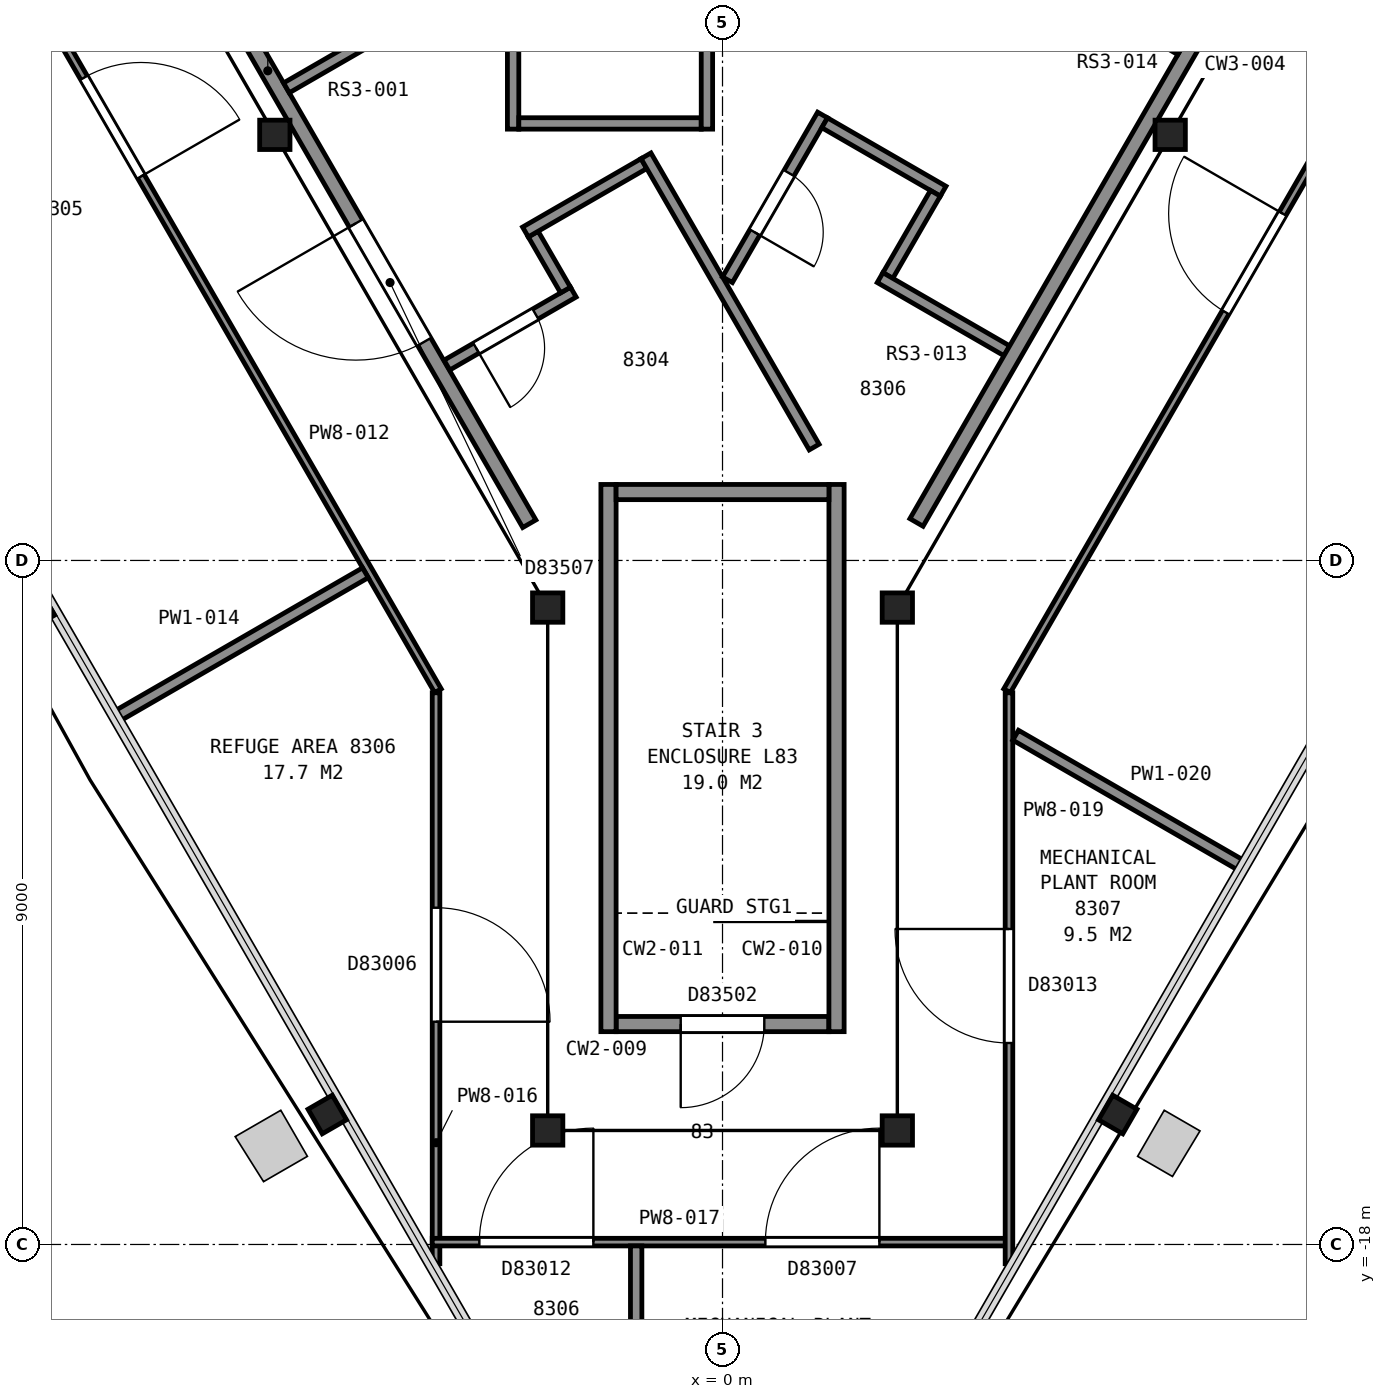
"""IFC4 building model, lengths in metres.
Left out: names, types, materials, properties, quantities, classifications, styles, units other than length and angle.
Written with IfcOpenShell. Run it as: python <this file> out.ifc"""

import sys

from ifc_helpers import new_model, si_unit, direction, frame, frame_2d, origin, origin_2d, place, context, subcontext, project, spatial, rectangle, i_section, extrude, element, fill, save


model = new_model("IFC4")
c1 = context("Model", 3, precision=1e-05, world=origin(), true_north=direction((0.0, 1.0)))
c2 = subcontext(c1, "Body", "Model", "MODEL_VIEW")
j1 = project(units=[si_unit("LENGTHUNIT", "METRE"), si_unit("PLANEANGLEUNIT", "RADIAN")], contexts=[c1])
p1 = place(None, origin())
s1 = spatial("IfcSite", under=j1, at=p1, CompositionType="ELEMENT")
p2 = place(p1, origin())
s2 = spatial("IfcBuilding", under=s1, at=p2, CompositionType="ELEMENT")
p3 = place(p2, frame((0.0, 0.0, 329.4)))
s3 = spatial("IfcBuildingStorey", under=s2, at=p3, CompositionType="ELEMENT", Elevation=329.4)
p4 = place(p3, frame((-9.04, -9.65, 0.0), z_axis=(0.0, 0.0, 1.0), x_axis=(-0.5, 0.866025403784, 0.0)))
e1 = element("IfcColumn", 1, at=p4, inside=s3, PredefinedType="COLUMN", context=c2, shape_type="SweptSolid", body=[
    extrude(i_section(OverallWidth=0.373, OverallDepth=0.368, WebThickness=0.015, FlangeThickness=0.024, FilletRadius=0.015, at=origin_2d()), origin(), (0.0, 0.0, 1.0), 4.59),
])
p5 = place(p3, frame((-5.2, -16.29, 0.0), z_axis=(0.0, 0.0, 1.0), x_axis=(-0.5, 0.866025403784, 0.0)))
e2 = element("IfcColumn", 2, at=p5, inside=s3, PredefinedType="COLUMN", context=c2, shape_type="SweptSolid", body=[
    extrude(i_section(OverallWidth=0.373, OverallDepth=0.368, WebThickness=0.015, FlangeThickness=0.024, FilletRadius=0.015, at=origin_2d()), origin(), (0.0, 0.0, 1.0), 4.34),
])
p6 = place(p3, frame((5.2, -16.29, 0.0), z_axis=(0.0, 0.0, 1.0), x_axis=(-0.5, -0.866025403784, 0.0)))
e3 = element("IfcColumn", 3, at=p6, inside=s3, PredefinedType="COLUMN", context=c2, shape_type="SweptSolid", body=[
    extrude(i_section(OverallWidth=0.373, OverallDepth=0.368, WebThickness=0.015, FlangeThickness=0.024, FilletRadius=0.015, at=origin_2d()), origin(), (0.0, 0.0, 1.0), 4.13),
])
for number, where, z_axis, x_axis in (
    (4, (-5.89, -3.4, 0.0), (0.0, 0.0, 1.0), (1.0, 0.0, 0.0)),
    (5, (-2.3, -9.62, 0.0), (0.0, 0.0, 1.0), (1.0, 0.0, 0.0)),
    (6, (-2.3, -16.5, 0.0), (0.0, 0.0, 1.0), (-1.0, 0.0, 0.0)),
    (7, (2.3, -16.5, 0.0), (0.0, 0.0, 1.0), (-1.0, 0.0, 0.0)),
    (8, (2.3, -9.62, 0.0), (0.0, 0.0, 1.0), (1.0, 0.0, 0.0)),
    (9, (5.89, -3.4, 0.0), (0.0, 0.0, 1.0), (1.0, 0.0, 0.0)),
):
    element("IfcColumn", number, at=place(p3, frame(where, z_axis=z_axis, x_axis=x_axis)), inside=s3, PredefinedType="COLUMN", context=c2, shape_type="SweptSolid", body=[
        extrude(i_section(OverallWidth=0.399, OverallDepth=0.386, WebThickness=0.021, FlangeThickness=0.033, FilletRadius=0.015, at=origin_2d()), origin(), (0.0, 0.0, 1.0), 4.2),
    ])
p7 = place(p3, frame((-1.4, -15.1, 0.0), z_axis=(0.0, 0.0, 1.0), x_axis=(1.0, 0.0, 0.0)))
e10 = element("IfcWall", 10, at=p7, inside=s3, PredefinedType="PARTITIONING", context=c2, shape_type="SweptSolid", body=[
    extrude(rectangle(XDim=2.8, YDim=0.2, at=frame_2d((1.4, 0.0))), origin(), (0.0, 0.0, 1.0), 4.2),
])
p8 = place(p7, frame((0.85, 0.0, 0.0)))
e11 = element("IfcOpeningElement", 11, at=p8, cuts=e10, PredefinedType="OPENING", context=c2, shape_type="SweptSolid", body=[
    extrude(rectangle(XDim=1.1, YDim=2.1, at=frame_2d((0.55, 1.05))), frame((0.0, 0.11, 0.0), z_axis=(0.0, -1.0, 0.0), x_axis=(1.0, 0.0, 0.0)), (0.0, 0.0, 1.0), 0.22),
])
for number, where, z_axis, x_axis in (
    (12, (1.5, -8.0, 0.0), (0.0, 0.0, 1.0), (0.0, -1.0, 0.0)),
    (13, (-1.5, -8.0, 0.0), (0.0, 0.0, 1.0), (0.0, -1.0, 0.0)),
):
    element("IfcWall", number, at=place(p3, frame(where, z_axis=z_axis, x_axis=x_axis)), inside=s3, PredefinedType="PARTITIONING", context=c2, shape_type="SweptSolid", body=[
        extrude(rectangle(XDim=7.2, YDim=0.2, at=frame_2d((3.6, 0.0))), origin(), (0.0, 0.0, 1.0), 4.2),
    ])
p9 = place(p3, frame((-1.4, -8.1, 0.0), z_axis=(0.0, 0.0, 1.0), x_axis=(1.0, 0.0, 0.0)))
e14 = element("IfcWall", 14, at=p9, inside=s3, PredefinedType="PARTITIONING", context=c2, shape_type="SweptSolid", body=[
    extrude(rectangle(XDim=2.8, YDim=0.2, at=frame_2d((1.4, 0.0))), origin(), (0.0, 0.0, 1.0), 4.2),
])
p10 = place(p3, frame((-7.141, -0.551, 0.0), z_axis=(0.0, 0.0, 1.0), x_axis=(0.499992795234, -0.866029563418, 0.0)))
e15 = element("IfcWall", 15, at=p10, inside=s3, PredefinedType="PARTITIONING", context=c2, shape_type="SweptSolid", body=[
    extrude(rectangle(XDim=9.198, YDim=0.2, at=frame_2d((4.599, 0.0))), origin(), (0.0, 0.0, 1.0), 3.9),
])
p11 = place(p10, frame((4.634, 0.0, 0.0)))
e16 = element("IfcOpeningElement", 16, at=p11, cuts=e15, PredefinedType="OPENING", context=c2, shape_type="SweptSolid", body=[
    extrude(rectangle(XDim=1.8, YDim=2.1, at=frame_2d((0.9, 1.05))), frame((0.0, 0.11, 0.0), z_axis=(0.0, -1.0, 0.0), x_axis=(1.0, 0.0, 0.0)), (0.0, 0.0, 1.0), 0.22),
])
p12 = place(p3, frame((-5.737, -2.782, 0.0), z_axis=(0.0, 0.0, 1.0), x_axis=(0.866000843773, 0.500042536776, 0.0)))
e17 = element("IfcWall", 17, at=p12, inside=s3, PredefinedType="PARTITIONING", context=c2, shape_type="SweptSolid", body=[
    extrude(rectangle(XDim=2.025, YDim=0.15, at=frame_2d((1.012, 0.0))), origin(), (0.0, 0.0, 1.0), 3.9),
])
p13 = place(p3, frame((-1.963, -5.469, 0.0), z_axis=(0.0, 0.0, 1.0), x_axis=(-0.866043720474, -0.49996827322, 0.0)))
e18 = element("IfcWall", 18, at=p13, inside=s3, PredefinedType="PARTITIONING", context=c2, shape_type="SweptSolid", body=[
    extrude(rectangle(XDim=1.92, YDim=0.15, at=frame_2d((0.96, 0.0))), origin(), (0.0, 0.0, 1.0), 3.9),
])
p14 = place(p13, frame((0.575, 0.0, 0.0)))
e19 = element("IfcOpeningElement", 19, at=p14, cuts=e18, PredefinedType="OPENING", context=c2, shape_type="SweptSolid", body=[
    extrude(rectangle(XDim=0.9, YDim=2.1, at=frame_2d((0.45, 1.05))), frame((0.0, 0.085, 0.0), z_axis=(0.0, -1.0, 0.0), x_axis=(1.0, 0.0, 0.0)), (0.0, 0.0, 1.0), 0.17),
])
p15 = place(p3, frame((-2.755, -0.102, 0.0), z_axis=(0.0, 0.0, 1.0), x_axis=(0.0, -1.0, 0.0)))
e20 = element("IfcWall", 20, at=p15, inside=s3, PredefinedType="PARTITIONING", context=c2, shape_type="SweptSolid", body=[
    extrude(rectangle(XDim=3.223, YDim=0.15, at=frame_2d((1.611, 0.0))), origin(), (0.0, 0.0, 1.0), 3.9),
])
p16 = place(p15, frame((1.148, 0.0, 0.0)))
e21 = element("IfcOpeningElement", 21, at=p16, cuts=e20, PredefinedType="OPENING", context=c2, shape_type="SweptSolid", body=[
    extrude(rectangle(XDim=0.9, YDim=2.1, at=frame_2d((0.45, 1.05))), frame((0.0, 0.085, 0.0), z_axis=(0.0, -1.0, 0.0), x_axis=(1.0, 0.0, 0.0)), (0.0, 0.0, 1.0), 0.17),
])
p17 = place(p3, frame((-2.68, -3.25, 0.0), z_axis=(0.0, 0.0, 1.0), x_axis=(1.0, 0.0, 0.0)))
e22 = element("IfcWall", 22, at=p17, inside=s3, PredefinedType="PARTITIONING", context=c2, shape_type="SweptSolid", body=[
    extrude(rectangle(XDim=2.4, YDim=0.15, at=frame_2d((1.2, 0.0))), origin(), (0.0, 0.0, 1.0), 3.9),
])
p18 = place(p3, frame((-2.49, -4.706, 0.0), z_axis=(0.0, 0.0, 1.0), x_axis=(0.500062241894, -0.865989465428, 0.0)))
e23 = element("IfcWall", 23, at=p18, inside=s3, PredefinedType="PARTITIONING", context=c2, shape_type="SweptSolid", body=[
    extrude(rectangle(XDim=0.85, YDim=0.15, at=frame_2d((0.425, 0.0))), origin(), (0.0, 0.0, 1.0), 3.9),
])
p19 = place(p3, frame((-2.593, -4.678, 0.0), z_axis=(0.0, 0.0, 1.0), x_axis=(0.866081705922, 0.499902469156, 0.0)))
e24 = element("IfcWall", 24, at=p19, inside=s3, PredefinedType="PARTITIONING", context=c2, shape_type="SweptSolid", body=[
    extrude(rectangle(XDim=1.8, YDim=0.15, at=frame_2d((0.9, 0.0))), origin(), (0.0, 0.0, 1.0), 3.9),
])
p20 = place(p3, frame((-1.007, -3.676, 0.0), z_axis=(0.0, 0.0, 1.0), x_axis=(0.500037662692, -0.866003658127, 0.0)))
e25 = element("IfcWall", 25, at=p20, inside=s3, PredefinedType="PARTITIONING", context=c2, shape_type="SweptSolid", body=[
    extrude(rectangle(XDim=4.425, YDim=0.15, at=frame_2d((2.212, 0.0))), origin(), (0.0, 0.0, 1.0), 3.9),
])
p21 = place(p3, frame((-0.205, -3.325, 0.0), z_axis=(0.0, 0.0, 1.0), x_axis=(0.0, 1.0, 0.0)))
e26 = element("IfcWall", 26, at=p21, inside=s3, PredefinedType="PARTITIONING", context=c2, shape_type="SweptSolid", body=[
    extrude(rectangle(XDim=3.223, YDim=0.15, at=frame_2d((1.611, 0.0))), origin(), (0.0, 0.0, 1.0), 3.9),
])
p22 = place(p3, frame((1.316, -3.139, 0.0), z_axis=(0.0, 0.0, 1.0), x_axis=(-0.500063042646, -0.865989003036, 0.0)))
e27 = element("IfcWall", 27, at=p22, inside=s3, PredefinedType="PARTITIONING", context=c2, shape_type="SweptSolid", body=[
    extrude(rectangle(XDim=2.503, YDim=0.15, at=frame_2d((1.251, 0.0))), origin(), (0.0, 0.0, 1.0), 3.9),
])
p23 = place(p22, frame((0.883, 0.0, 0.0)))
e28 = element("IfcOpeningElement", 28, at=p23, cuts=e27, PredefinedType="OPENING", context=c2, shape_type="SweptSolid", body=[
    extrude(rectangle(XDim=0.9, YDim=2.1, at=frame_2d((0.45, 1.05))), frame((0.0, 0.085, 0.0), z_axis=(0.0, -1.0, 0.0), x_axis=(1.0, 0.0, 0.0)), (0.0, 0.0, 1.0), 0.17),
])
p24 = place(p3, frame((1.344, -3.241, 0.0), z_axis=(0.0, 0.0, 1.0), x_axis=(0.865989075817, -0.500062916607, 0.0)))
e29 = element("IfcWall", 29, at=p24, inside=s3, PredefinedType="PARTITIONING", context=c2, shape_type="SweptSolid", body=[
    extrude(rectangle(XDim=1.8, YDim=0.15, at=frame_2d((0.9, 0.0))), origin(), (0.0, 0.0, 1.0), 3.9),
])
p25 = place(p3, frame((2.176, -5.251, 0.0), z_axis=(0.0, 0.0, 1.0), x_axis=(0.500173430036, 0.86592525075, 0.0)))
e30 = element("IfcWall", 30, at=p25, inside=s3, PredefinedType="PARTITIONING", context=c2, shape_type="SweptSolid", body=[
    extrude(rectangle(XDim=1.25, YDim=0.15, at=frame_2d((0.625, 0.0))), origin(), (0.0, 0.0, 1.0), 3.9),
])
p26 = place(p3, frame((2.073, -5.279, 0.0), z_axis=(0.0, 0.0, 1.0), x_axis=(0.86609690551, -0.499876134923, 0.0)))
e31 = element("IfcWall", 31, at=p26, inside=s3, PredefinedType="PARTITIONING", context=c2, shape_type="SweptSolid", body=[
    extrude(rectangle(XDim=1.925, YDim=0.15, at=frame_2d((0.963, 0.0))), origin(), (0.0, 0.0, 1.0), 3.9),
])
p27 = place(p3, frame((2.552, -8.5, 0.0), z_axis=(0.0, 0.0, 1.0), x_axis=(0.499981156672, 0.866036282712, 0.0)))
e32 = element("IfcWall", 32, at=p27, inside=s3, PredefinedType="PARTITIONING", context=c2, shape_type="SweptSolid", body=[
    extrude(rectangle(XDim=13.915, YDim=0.2, at=frame_2d((6.957, 0.0))), origin(), (0.0, 0.0, 1.0), 3.9),
])
p28 = place(p3, frame((4.188, -1.217, 0.0), z_axis=(0.0, 0.0, 1.0), x_axis=(0.865913749133, -0.500193341681, 0.0)))
e33 = element("IfcWall", 33, at=p28, inside=s3, PredefinedType="PARTITIONING", context=c2, shape_type="SweptSolid", body=[
    extrude(rectangle(XDim=2.124, YDim=0.15, at=frame_2d((1.062, 0.0))), origin(), (0.0, 0.0, 1.0), 3.9),
])
p29 = place(p28, frame((0.575, 0.0, 0.0)))
e34 = element("IfcOpeningElement", 34, at=p29, cuts=e33, PredefinedType="OPENING", context=c2, shape_type="SweptSolid", body=[
    extrude(rectangle(XDim=0.9, YDim=2.1, at=frame_2d((0.45, 1.05))), frame((0.0, 0.085, 0.0), z_axis=(0.0, -1.0, 0.0), x_axis=(1.0, 0.0, 0.0)), (0.0, 0.0, 1.0), 0.17),
])
p30 = place(p3, frame((-3.744, -10.714, 0.0), z_axis=(0.0, 0.0, 1.0), x_axis=(-0.500044034969, 0.86599997869, 0.0)))
e35 = element("IfcWall", 35, at=p30, inside=s3, PredefinedType="PARTITIONING", context=c2, shape_type="SweptSolid", body=[
    extrude(rectangle(XDim=15.553, YDim=0.1, at=frame_2d((7.776, 0.0))), origin(), (0.0, 0.0, 1.0), 3.297),
])
p31 = place(p30, frame((7.814, 0.0, 0.0)))
e36 = element("IfcOpeningElement", 36, at=p31, cuts=e35, PredefinedType="OPENING", context=c2, shape_type="SweptSolid", body=[
    extrude(rectangle(XDim=1.5, YDim=2.1, at=frame_2d((0.75, 1.05))), frame((0.0, 0.06, 0.0), z_axis=(0.0, -1.0, 0.0), x_axis=(1.0, 0.0, 0.0)), (0.0, 0.0, 1.0), 0.12),
])
p32 = place(p3, frame((-7.975, -11.054, 0.0), z_axis=(0.0, 0.0, 1.0), x_axis=(0.865998594852, 0.500046431558, 0.0)))
e37 = element("IfcWall", 37, at=p32, inside=s3, PredefinedType="PARTITIONING", context=c2, shape_type="SweptSolid", body=[
    extrude(rectangle(XDim=3.783, YDim=0.15, at=frame_2d((1.892, 0.0))), origin(), (0.0, 0.0, 1.0), 3.297),
])
p33 = place(p3, frame((-3.769, -18.253, 0.0), z_axis=(0.0, 0.0, 1.0), x_axis=(0.0, 1.0, 0.0)))
e38 = element("IfcWall", 38, at=p33, inside=s3, PredefinedType="PARTITIONING", context=c2, shape_type="SweptSolid", body=[
    extrude(rectangle(XDim=7.512, YDim=0.1, at=frame_2d((3.756, 0.0))), origin(), (0.0, 0.0, 1.0), 3.297),
])
p34 = place(p33, frame((3.184, 0.0, 0.0)))
e39 = element("IfcOpeningElement", 39, at=p34, cuts=e38, PredefinedType="OPENING", context=c2, shape_type="SweptSolid", body=[
    extrude(rectangle(XDim=1.5, YDim=2.1, at=frame_2d((0.75, 1.05))), frame((0.0, 0.06, 0.0), z_axis=(0.0, -1.0, 0.0), x_axis=(1.0, 0.0, 0.0)), (0.0, 0.0, 1.0), 0.12),
])
p35 = place(p3, frame((3.769, -17.969, 0.0), z_axis=(0.0, 0.0, 1.0), x_axis=(-1.0, 0.0, 0.0)))
e40 = element("IfcWall", 40, at=p35, inside=s3, PredefinedType="PARTITIONING", context=c2, shape_type="SweptSolid", body=[
    extrude(rectangle(XDim=7.588, YDim=0.1, at=frame_2d((3.794, 0.0))), origin(), (0.0, 0.0, 1.0), 3.297),
])
p36 = place(p35, frame((1.705, 0.0, 0.0)))
e41 = element("IfcOpeningElement", 41, at=p36, cuts=e40, PredefinedType="OPENING", context=c2, shape_type="SweptSolid", body=[
    extrude(rectangle(XDim=1.5, YDim=2.1, at=frame_2d((0.75, 1.05))), frame((0.0, 0.06, 0.0), z_axis=(0.0, -1.0, 0.0), x_axis=(1.0, 0.0, 0.0)), (0.0, 0.0, 1.0), 0.12),
])
p37 = place(p35, frame((5.468, 0.0, 0.0)))
e42 = element("IfcOpeningElement", 42, at=p37, cuts=e40, PredefinedType="OPENING", context=c2, shape_type="SweptSolid", body=[
    extrude(rectangle(XDim=1.5, YDim=2.1, at=frame_2d((0.75, 1.05))), frame((0.0, 0.06, 0.0), z_axis=(0.0, -1.0, 0.0), x_axis=(1.0, 0.0, 0.0)), (0.0, 0.0, 1.0), 0.12),
])
p38 = place(p3, frame((-1.136, -22.764, 0.0), z_axis=(0.0, 0.0, 1.0), x_axis=(0.0, 1.0, 0.0)))
e43 = element("IfcWall", 43, at=p38, inside=s3, PredefinedType="PARTITIONING", context=c2, shape_type="SweptSolid", body=[
    extrude(rectangle(XDim=4.745, YDim=0.15, at=frame_2d((2.373, 0.0))), origin(), (0.0, 0.0, 1.0), 3.297),
])
p39 = place(p3, frame((3.769, -10.741, 0.0), z_axis=(0.0, 0.0, 1.0), x_axis=(0.0, -1.0, 0.0)))
e44 = element("IfcWall", 44, at=p39, inside=s3, PredefinedType="PARTITIONING", context=c2, shape_type="SweptSolid", body=[
    extrude(rectangle(XDim=7.512, YDim=0.1, at=frame_2d((3.756, 0.0))), origin(), (0.0, 0.0, 1.0), 3.297),
])
p40 = place(p39, frame((3.108, 0.0, 0.0)))
e45 = element("IfcOpeningElement", 45, at=p40, cuts=e44, PredefinedType="OPENING", context=c2, shape_type="SweptSolid", body=[
    extrude(rectangle(XDim=1.5, YDim=2.1, at=frame_2d((0.75, 1.05))), frame((0.0, 0.06, 0.0), z_axis=(0.0, -1.0, 0.0), x_axis=(1.0, 0.0, 0.0)), (0.0, 0.0, 1.0), 0.12),
])
p41 = place(p3, frame((3.856, -11.3, 0.0), z_axis=(0.0, 0.0, 1.0), x_axis=(0.866084061191, -0.499898388626, 0.0)))
e46 = element("IfcWall", 46, at=p41, inside=s3, PredefinedType="PARTITIONING", context=c2, shape_type="SweptSolid", body=[
    extrude(rectangle(XDim=3.444, YDim=0.15, at=frame_2d((1.722, 0.0))), origin(), (0.0, 0.0, 1.0), 3.297),
])
p42 = place(p3, frame((11.521, 2.754, 0.0), z_axis=(0.0, 0.0, 1.0), x_axis=(-0.500044034969, -0.86599997869, 0.0)))
e47 = element("IfcWall", 47, at=p42, inside=s3, PredefinedType="PARTITIONING", context=c2, shape_type="SweptSolid", body=[
    extrude(rectangle(XDim=15.553, YDim=0.1, at=frame_2d((7.776, 0.0))), origin(), (0.0, 0.0, 1.0), 3.297),
])
p43 = place(p42, frame((8.303, 0.0, 0.0)))
e48 = element("IfcOpeningElement", 48, at=p43, cuts=e47, PredefinedType="OPENING", context=c2, shape_type="SweptSolid", body=[
    extrude(rectangle(XDim=1.5, YDim=2.1, at=frame_2d((0.75, 1.05))), frame((0.0, 0.06, 0.0), z_axis=(0.0, -1.0, 0.0), x_axis=(1.0, 0.0, 0.0)), (0.0, 0.0, 1.0), 0.12),
])
p44 = place(p42, frame((0.561, 0.0, 0.0)))
e49 = element("IfcOpeningElement", 49, at=p44, cuts=e47, PredefinedType="OPENING", context=c2, shape_type="SweptSolid", body=[
    extrude(rectangle(XDim=1.5, YDim=2.1, at=frame_2d((0.75, 1.05))), frame((0.0, 0.06, 0.0), z_axis=(0.0, -1.0, 0.0), x_axis=(1.0, 0.0, 0.0)), (0.0, 0.0, 1.0), 0.12),
])
p45 = place(p8, origin())
e50 = element("IfcDoor", 50, at=p45, inside=s3, OperationType="SINGLE_SWING_LEFT", PredefinedType="DOOR", context=c2, shape_type="SweptSolid", body=[
    extrude(rectangle(XDim=1.1, YDim=2.1, at=frame_2d((0.55, 1.05))), frame((0.0, 0.025, 0.0), z_axis=(0.0, -1.0, 0.0), x_axis=(1.0, 0.0, 0.0)), (0.0, 0.0, 1.0), 0.05),
])
fill(e11, e50)
p46 = place(p11, origin())
e51 = element("IfcDoor", 51, at=p46, inside=s3, OperationType="DOUBLE_DOOR_SINGLE_SWING", PredefinedType="DOOR", context=c2, shape_type="SweptSolid", body=[
    extrude(rectangle(XDim=1.8, YDim=2.1, at=frame_2d((0.9, 1.05))), frame((0.0, 0.025, 0.0), z_axis=(0.0, -1.0, 0.0), x_axis=(1.0, 0.0, 0.0)), (0.0, 0.0, 1.0), 0.05),
])
fill(e16, e51)
p47 = place(p14, origin())
e52 = element("IfcDoor", 52, at=p47, inside=s3, OperationType="SINGLE_SWING_RIGHT", PredefinedType="DOOR", context=c2, shape_type="SweptSolid", body=[
    extrude(rectangle(XDim=0.9, YDim=2.1, at=frame_2d((0.45, 1.05))), frame((0.0, 0.025, 0.0), z_axis=(0.0, -1.0, 0.0), x_axis=(1.0, 0.0, 0.0)), (0.0, 0.0, 1.0), 0.05),
])
fill(e19, e52)
p48 = place(p23, origin())
e53 = element("IfcDoor", 53, at=p48, inside=s3, OperationType="SINGLE_SWING_RIGHT", PredefinedType="DOOR", context=c2, shape_type="SweptSolid", body=[
    extrude(rectangle(XDim=0.9, YDim=2.1, at=frame_2d((0.45, 1.05))), frame((0.0, 0.025, 0.0), z_axis=(0.0, -1.0, 0.0), x_axis=(1.0, 0.0, 0.0)), (0.0, 0.0, 1.0), 0.05),
])
fill(e28, e53)
p49 = place(p31, origin())
e54 = element("IfcDoor", 54, at=p49, inside=s3, OperationType="DOUBLE_DOOR_SINGLE_SWING", PredefinedType="DOOR", context=c2, shape_type="SweptSolid", body=[
    extrude(rectangle(XDim=1.5, YDim=2.1, at=frame_2d((0.75, 1.05))), frame((0.0, 0.025, 0.0), z_axis=(0.0, -1.0, 0.0), x_axis=(1.0, 0.0, 0.0)), (0.0, 0.0, 1.0), 0.05),
])
fill(e36, e54)
p50 = place(p34, origin())
e55 = element("IfcDoor", 55, at=p50, inside=s3, OperationType="DOUBLE_DOOR_SINGLE_SWING", PredefinedType="DOOR", context=c2, shape_type="SweptSolid", body=[
    extrude(rectangle(XDim=1.5, YDim=2.1, at=frame_2d((0.75, 1.05))), frame((0.0, 0.025, 0.0), z_axis=(0.0, -1.0, 0.0), x_axis=(1.0, 0.0, 0.0)), (0.0, 0.0, 1.0), 0.05),
])
fill(e39, e55)
p51 = place(p36, origin())
e56 = element("IfcDoor", 56, at=p51, inside=s3, OperationType="DOUBLE_DOOR_SINGLE_SWING", PredefinedType="DOOR", context=c2, shape_type="SweptSolid", body=[
    extrude(rectangle(XDim=1.5, YDim=2.1, at=frame_2d((0.75, 1.05))), frame((0.0, 0.025, 0.0), z_axis=(0.0, -1.0, 0.0), x_axis=(1.0, 0.0, 0.0)), (0.0, 0.0, 1.0), 0.05),
])
fill(e41, e56)
p52 = place(p37, origin())
e57 = element("IfcDoor", 57, at=p52, inside=s3, OperationType="DOUBLE_DOOR_SINGLE_SWING", PredefinedType="DOOR", context=c2, shape_type="SweptSolid", body=[
    extrude(rectangle(XDim=1.5, YDim=2.1, at=frame_2d((0.75, 1.05))), frame((0.0, 0.025, 0.0), z_axis=(0.0, -1.0, 0.0), x_axis=(1.0, 0.0, 0.0)), (0.0, 0.0, 1.0), 0.05),
])
fill(e42, e57)
p53 = place(p40, origin())
e58 = element("IfcDoor", 58, at=p53, inside=s3, OperationType="DOUBLE_DOOR_SINGLE_SWING", PredefinedType="DOOR", context=c2, shape_type="SweptSolid", body=[
    extrude(rectangle(XDim=1.5, YDim=2.1, at=frame_2d((0.75, 1.05))), frame((0.0, 0.025, 0.0), z_axis=(0.0, -1.0, 0.0), x_axis=(1.0, 0.0, 0.0)), (0.0, 0.0, 1.0), 0.05),
])
fill(e45, e58)
p54 = place(p43, origin())
e59 = element("IfcDoor", 59, at=p54, inside=s3, OperationType="DOUBLE_DOOR_SINGLE_SWING", PredefinedType="DOOR", context=c2, shape_type="SweptSolid", body=[
    extrude(rectangle(XDim=1.5, YDim=2.1, at=frame_2d((0.75, 1.05))), frame((0.0, 0.025, 0.0), z_axis=(0.0, -1.0, 0.0), x_axis=(1.0, 0.0, 0.0)), (0.0, 0.0, 1.0), 0.05),
])
fill(e48, e59)
save(model, sys.argv[1])
